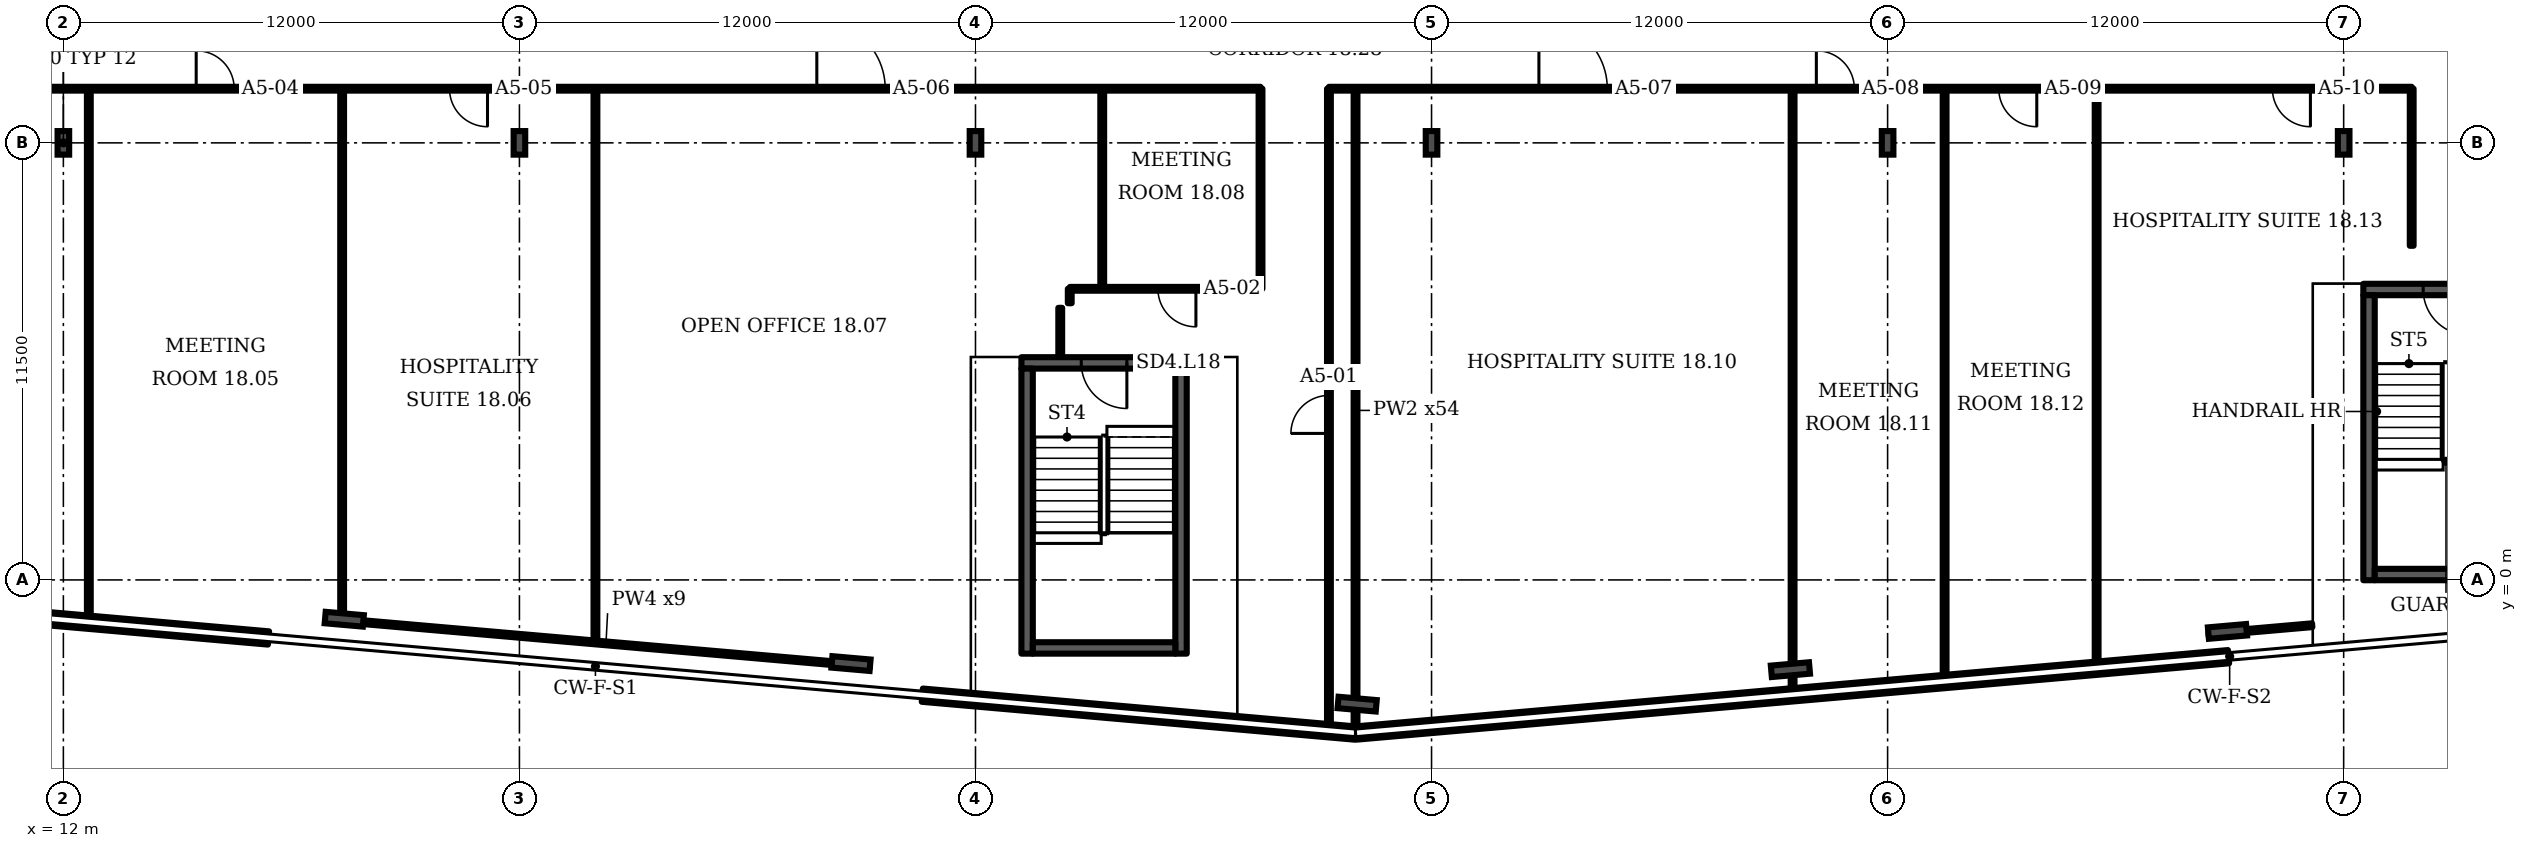
"""IFC4 building model, lengths in metres.
Left out: names, types, materials, properties, quantities, classifications, styles, units other than length and angle.
Written with IfcOpenShell. Run it as: python <this file> out.ifc"""

import sys

from ifc_helpers import new_model, si_unit, direction, frame, frame_2d, origin, origin_2d, place, context, subcontext, project, spatial, rectangle, i_section, extrude, element, fill, save


model = new_model("IFC4")
c1 = context("Model", 3, precision=1e-05, world=origin(), true_north=direction((0.0, 1.0)))
c2 = subcontext(c1, "Body", "Model", "MODEL_VIEW")
j1 = project(units=[si_unit("LENGTHUNIT", "METRE"), si_unit("PLANEANGLEUNIT", "RADIAN")], contexts=[c1])
p1 = place(None, origin())
s1 = spatial("IfcSite", under=j1, at=p1, CompositionType="ELEMENT")
p2 = place(p1, origin())
s2 = spatial("IfcBuilding", under=s1, at=p2, CompositionType="ELEMENT")
p3 = place(p2, frame((0.0, 0.0, 84.7)))
s3 = spatial("IfcBuildingStorey", under=s2, at=p3, CompositionType="ELEMENT", Elevation=84.7)
for number, where, z_axis, x_axis in (
    (1, (19.391, -1.034, 0.0), (0.0, 0.0, 1.0), (-0.087, -0.996, 0.0)),
    (2, (32.724, -2.2, 0.0), (0.0, 0.0, 1.0), (-0.087, -0.996, 0.0)),
    (3, (46.042, -3.268, 0.0), (0.0, 0.0, 1.0), (-0.087, -0.996, 0.0)),
    (4, (57.442, -2.361, 0.0), (0.0, 0.0, 1.0), (0.087, -0.996, 0.0)),
    (5, (68.942, -1.355, 0.0), (0.0, 0.0, 1.0), (0.087, -0.996, 0.0)),
):
    element("IfcColumn", number, at=place(p3, frame(where, z_axis=z_axis, x_axis=x_axis)), inside=s3, PredefinedType="COLUMN", context=c2, shape_type="SweptSolid", body=[
        extrude(i_section(OverallWidth=0.302, OverallDepth=1.008, WebThickness=0.021, FlangeThickness=0.04, FilletRadius=0.03, at=origin_2d()), origin(), (0.0, 0.0, 1.0), 3.6),
    ])
for number, where, z_axis, x_axis in (
    (6, (12.0, 11.5, 0.0), (0.0, 0.0, 1.0), (1.0, 0.0, 0.0)),
    (7, (24.0, 11.5, 0.0), (0.0, 0.0, 1.0), (1.0, 0.0, 0.0)),
    (8, (36.0, 11.5, 0.0), (0.0, 0.0, 1.0), (1.0, 0.0, 0.0)),
    (9, (48.0, 11.5, 0.0), (0.0, 0.0, 1.0), (1.0, 0.0, 0.0)),
    (10, (60.0, 11.5, 0.0), (0.0, 0.0, 1.0), (1.0, 0.0, 0.0)),
    (11, (72.0, 11.5, 0.0), (0.0, 0.0, 1.0), (1.0, 0.0, 0.0)),
):
    element("IfcColumn", number, at=place(p3, frame(where, z_axis=z_axis, x_axis=x_axis)), inside=s3, PredefinedType="COLUMN", context=c2, shape_type="SweptSolid", body=[
        extrude(i_section(OverallWidth=0.305, OverallDepth=0.62, WebThickness=0.021, FlangeThickness=0.04, FilletRadius=0.027, at=origin_2d()), origin(), (0.0, 0.0, 1.0), 3.6),
    ])
p4 = place(p3, frame((5.835, -0.516, 0.0), z_axis=(0.0, 0.0, 1.0), x_axis=(0.996192, -0.087142, 0.0)))
e12 = element("IfcWall", 12, at=p4, inside=s3, PredefinedType="SOLIDWALL", context=c2, shape_type="SweptSolid", body=[
    extrude(rectangle(XDim=11.607, YDim=0.35, at=frame_2d((5.804, 0.0))), origin(), (0.0, 0.0, 1.0), 1.0),
])
p5 = place(p3, frame((34.601, -3.032, 0.0), z_axis=(0.0, 0.0, 1.0), x_axis=(0.996193, -0.087148, 0.0)))
e13 = element("IfcWall", 13, at=p5, inside=s3, PredefinedType="SOLIDWALL", context=c2, shape_type="SweptSolid", body=[
    extrude(rectangle(XDim=11.458, YDim=0.35, at=frame_2d((5.729, 0.0))), origin(), (0.0, 0.0, 1.0), 1.0),
])
p6 = place(p3, frame((46.045, -4.026, 0.0), z_axis=(0.0, 0.0, 1.0), x_axis=(0.99619, 0.087163, 0.0)))
e14 = element("IfcWall", 14, at=p6, inside=s3, PredefinedType="SOLIDWALL", context=c2, shape_type="SweptSolid", body=[
    extrude(rectangle(XDim=23.013, YDim=0.35, at=frame_2d((11.506, 0.0))), origin(), (0.0, 0.0, 1.0), 1.0),
])
p7 = place(p3, frame((37.208, 5.711, 0.0), z_axis=(0.0, 0.0, 1.0), x_axis=(1.0, 0.0, 0.0)))
e15 = element("IfcWall", 15, at=p7, inside=s3, PredefinedType="SHEAR", context=c2, shape_type="SweptSolid", body=[
    extrude(rectangle(XDim=4.35, YDim=0.3, at=frame_2d((2.175, 0.0))), origin(), (0.0, 0.0, 1.0), 3.2),
])
p8 = place(p7, frame((1.575, 0.0, 0.0)))
e16 = element("IfcOpeningElement", 16, at=p8, cuts=e15, PredefinedType="OPENING", context=c2, shape_type="SweptSolid", body=[
    extrude(rectangle(XDim=1.2, YDim=2.1, at=frame_2d((0.6, 1.05))), frame((0.0, 0.16, 0.0), z_axis=(0.0, -1.0, 0.0), x_axis=(1.0, 0.0, 0.0)), (0.0, 0.0, 1.0), 0.32),
])
p9 = place(p3, frame((72.518, 7.642, 0.0), z_axis=(0.0, 0.0, 1.0), x_axis=(1.0, 0.0, 0.0)))
e17 = element("IfcWall", 17, at=p9, inside=s3, PredefinedType="SHEAR", context=c2, shape_type="SweptSolid", body=[
    extrude(rectangle(XDim=4.35, YDim=0.3, at=frame_2d((2.175, 0.0))), origin(), (0.0, 0.0, 1.0), 3.2),
])
p10 = place(p9, frame((1.575, 0.0, 0.0)))
e18 = element("IfcOpeningElement", 18, at=p10, cuts=e17, PredefinedType="OPENING", context=c2, shape_type="SweptSolid", body=[
    extrude(rectangle(XDim=1.2, YDim=2.1, at=frame_2d((0.6, 1.05))), frame((0.0, 0.16, 0.0), z_axis=(0.0, -1.0, 0.0), x_axis=(1.0, 0.0, 0.0)), (0.0, 0.0, 1.0), 0.32),
])
p11 = place(p3, frame((0.02, 12.925, 0.0), z_axis=(0.0, 0.0, 1.0), x_axis=(1.0, 0.0, 0.0)))
e19 = element("IfcWall", 19, at=p11, inside=s3, PredefinedType="PARTITIONING", context=c2, shape_type="SweptSolid", body=[
    extrude(rectangle(XDim=43.48, YDim=0.1, at=frame_2d((21.74, 0.0))), origin(), (0.0, 0.0, 1.0), 3.2),
])
p12 = place(p11, frame((5.405, 0.0, 0.0)))
e20 = element("IfcOpeningElement", 20, at=p12, cuts=e19, PredefinedType="OPENING", context=c2, shape_type="SweptSolid", body=[
    extrude(rectangle(XDim=1.8, YDim=2.1, at=frame_2d((0.9, 1.05))), frame((0.0, 0.06, 0.0), z_axis=(0.0, -1.0, 0.0), x_axis=(1.0, 0.0, 0.0)), (0.0, 0.0, 1.0), 0.12),
])
p13 = place(p11, frame((15.475, 0.0, 0.0)))
e21 = element("IfcOpeningElement", 21, at=p13, cuts=e19, PredefinedType="OPENING", context=c2, shape_type="SweptSolid", body=[
    extrude(rectangle(XDim=1.0, YDim=2.1, at=frame_2d((0.5, 1.05))), frame((0.0, 0.06, 0.0), z_axis=(0.0, -1.0, 0.0), x_axis=(1.0, 0.0, 0.0)), (0.0, 0.0, 1.0), 0.12),
])
p14 = place(p11, frame((22.14, 0.0, 0.0)))
e22 = element("IfcOpeningElement", 22, at=p14, cuts=e19, PredefinedType="OPENING", context=c2, shape_type="SweptSolid", body=[
    extrude(rectangle(XDim=1.0, YDim=2.1, at=frame_2d((0.5, 1.05))), frame((0.0, 0.06, 0.0), z_axis=(0.0, -1.0, 0.0), x_axis=(1.0, 0.0, 0.0)), (0.0, 0.0, 1.0), 0.12),
])
p15 = place(p11, frame((31.805, 0.0, 0.0)))
e23 = element("IfcOpeningElement", 23, at=p15, cuts=e19, PredefinedType="OPENING", context=c2, shape_type="SweptSolid", body=[
    extrude(rectangle(XDim=1.8, YDim=2.1, at=frame_2d((0.9, 1.05))), frame((0.0, 0.06, 0.0), z_axis=(0.0, -1.0, 0.0), x_axis=(1.0, 0.0, 0.0)), (0.0, 0.0, 1.0), 0.12),
])
p16 = place(p3, frame((12.67, -1.088, 0.0), z_axis=(0.0, 0.0, 1.0), x_axis=(0.0, 1.0, 0.0)))
e24 = element("IfcWall", 24, at=p16, inside=s3, PredefinedType="PARTITIONING", context=c2, shape_type="SweptSolid", body=[
    extrude(rectangle(XDim=14.013, YDim=0.1, at=frame_2d((7.007, 0.0))), origin(), (0.0, 0.0, 1.0), 3.2),
])
p17 = place(p3, frame((19.335, -1.06, 0.0), z_axis=(0.0, 0.0, 1.0), x_axis=(0.0, 1.0, 0.0)))
e25 = element("IfcWall", 25, at=p17, inside=s3, PredefinedType="PARTITIONING", context=c2, shape_type="SweptSolid", body=[
    extrude(rectangle(XDim=13.985, YDim=0.1, at=frame_2d((6.993, 0.0))), origin(), (0.0, 0.0, 1.0), 3.2),
])
p18 = place(p3, frame((26.0, -1.645, 0.0), z_axis=(0.0, 0.0, 1.0), x_axis=(0.0, 1.0, 0.0)))
e26 = element("IfcWall", 26, at=p18, inside=s3, PredefinedType="PARTITIONING", context=c2, shape_type="SweptSolid", body=[
    extrude(rectangle(XDim=14.57, YDim=0.1, at=frame_2d((7.285, 0.0))), origin(), (0.0, 0.0, 1.0), 3.2),
])
p19 = place(p3, frame((33.22, -2.275, 0.0), z_axis=(0.0, 0.0, 1.0), x_axis=(-0.996218, 0.086914, 0.0)))
e27 = element("IfcWall", 27, at=p19, inside=s3, PredefinedType="PARTITIONING", context=c2, shape_type="SweptSolid", body=[
    extrude(rectangle(XDim=13.938, YDim=0.1, at=frame_2d((6.969, 0.0))), origin(), (0.0, 0.0, 1.0), 2.58),
])
p20 = place(p3, frame((38.23, 5.881, 0.0), z_axis=(0.0, 0.0, 1.0), x_axis=(0.0, 1.0, 0.0)))
e28 = element("IfcWall", 28, at=p20, inside=s3, PredefinedType="PARTITIONING", context=c2, shape_type="SweptSolid", body=[
    extrude(rectangle(XDim=1.279, YDim=0.1, at=frame_2d((0.64, 0.0))), origin(), (0.0, 0.0, 1.0), 3.2),
])
p21 = place(p3, frame((38.48, 7.28, 0.0), z_axis=(0.0, 0.0, 1.0), x_axis=(0.0, 1.0, 0.0)))
e29 = element("IfcWall", 29, at=p21, inside=s3, PredefinedType="PARTITIONING", context=c2, shape_type="SweptSolid", body=[
    extrude(rectangle(XDim=0.38, YDim=0.1, at=frame_2d((0.19, 0.0))), origin(), (0.0, 0.0, 1.0), 3.2),
])
p22 = place(p3, frame((38.485, 7.66, 0.0), z_axis=(0.0, 0.0, 1.0), x_axis=(1.0, 0.0, 0.0)))
e30 = element("IfcWall", 30, at=p22, inside=s3, PredefinedType="PARTITIONING", context=c2, shape_type="SweptSolid", body=[
    extrude(rectangle(XDim=5.015, YDim=0.1, at=frame_2d((2.507, 0.0))), origin(), (0.0, 0.0, 1.0), 3.2),
])
p23 = place(p22, frame((2.315, 0.0, 0.0)))
e31 = element("IfcOpeningElement", 31, at=p23, cuts=e30, PredefinedType="OPENING", context=c2, shape_type="SweptSolid", body=[
    extrude(rectangle(XDim=1.0, YDim=2.1, at=frame_2d((0.5, 1.05))), frame((0.0, 0.06, 0.0), z_axis=(0.0, -1.0, 0.0), x_axis=(1.0, 0.0, 0.0)), (0.0, 0.0, 1.0), 0.12),
])
for number, where, z_axis, x_axis in (
    (32, (39.335, 7.66, 0.0), (0.0, 0.0, 1.0), (0.0, 1.0, 0.0)),
    (33, (43.5, 7.66, 0.0), (0.0, 0.0, 1.0), (0.0, 1.0, 0.0)),
):
    element("IfcWall", number, at=place(p3, frame(where, z_axis=z_axis, x_axis=x_axis)), inside=s3, PredefinedType="PARTITIONING", context=c2, shape_type="SweptSolid", body=[
        extrude(rectangle(XDim=5.265, YDim=0.1, at=frame_2d((2.633, 0.0))), origin(), (0.0, 0.0, 1.0), 3.2),
    ])
p24 = place(p3, frame((45.3, -3.943, 0.0), z_axis=(0.0, 0.0, 1.0), x_axis=(0.0, 1.0, 0.0)))
e34 = element("IfcWall", 34, at=p24, inside=s3, PredefinedType="PARTITIONING", context=c2, shape_type="SweptSolid", body=[
    extrude(rectangle(XDim=16.868, YDim=0.1, at=frame_2d((8.434, 0.0))), origin(), (0.0, 0.0, 1.0), 2.58),
])
p25 = place(p24, frame((7.798, 0.0, 0.0)))
e35 = element("IfcOpeningElement", 35, at=p25, cuts=e34, PredefinedType="OPENING", context=c2, shape_type="SweptSolid", body=[
    extrude(rectangle(XDim=1.0, YDim=2.1, at=frame_2d((0.5, 1.05))), frame((0.0, 0.06, 0.0), z_axis=(0.0, -1.0, 0.0), x_axis=(1.0, 0.0, 0.0)), (0.0, 0.0, 1.0), 0.12),
])
p26 = place(p3, frame((45.3, 12.925, 0.0), z_axis=(0.0, 0.0, 1.0), x_axis=(1.0, 0.0, 0.0)))
e36 = element("IfcWall", 36, at=p26, inside=s3, PredefinedType="PARTITIONING", context=c2, shape_type="SweptSolid", body=[
    extrude(rectangle(XDim=28.49, YDim=0.1, at=frame_2d((14.245, 0.0))), origin(), (0.0, 0.0, 1.0), 3.2),
])
p27 = place(p26, frame((5.525, 0.0, 0.0)))
e37 = element("IfcOpeningElement", 37, at=p27, cuts=e36, PredefinedType="OPENING", context=c2, shape_type="SweptSolid", body=[
    extrude(rectangle(XDim=1.8, YDim=2.1, at=frame_2d((0.9, 1.05))), frame((0.0, 0.06, 0.0), z_axis=(0.0, -1.0, 0.0), x_axis=(1.0, 0.0, 0.0)), (0.0, 0.0, 1.0), 0.12),
])
p28 = place(p26, frame((12.825, 0.0, 0.0)))
e38 = element("IfcOpeningElement", 38, at=p28, cuts=e36, PredefinedType="OPENING", context=c2, shape_type="SweptSolid", body=[
    extrude(rectangle(XDim=1.0, YDim=2.1, at=frame_2d((0.5, 1.05))), frame((0.0, 0.06, 0.0), z_axis=(0.0, -1.0, 0.0), x_axis=(1.0, 0.0, 0.0)), (0.0, 0.0, 1.0), 0.12),
])
p29 = place(p26, frame((17.625, 0.0, 0.0)))
e39 = element("IfcOpeningElement", 39, at=p29, cuts=e36, PredefinedType="OPENING", context=c2, shape_type="SweptSolid", body=[
    extrude(rectangle(XDim=1.0, YDim=2.1, at=frame_2d((0.5, 1.05))), frame((0.0, 0.06, 0.0), z_axis=(0.0, -1.0, 0.0), x_axis=(1.0, 0.0, 0.0)), (0.0, 0.0, 1.0), 0.12),
])
p30 = place(p26, frame((24.825, 0.0, 0.0)))
e40 = element("IfcOpeningElement", 40, at=p30, cuts=e36, PredefinedType="OPENING", context=c2, shape_type="SweptSolid", body=[
    extrude(rectangle(XDim=1.0, YDim=2.1, at=frame_2d((0.5, 1.05))), frame((0.0, 0.06, 0.0), z_axis=(0.0, -1.0, 0.0), x_axis=(1.0, 0.0, 0.0)), (0.0, 0.0, 1.0), 0.12),
])
p31 = place(p3, frame((46.0, -4.004, 0.0), z_axis=(0.0, 0.0, 1.0), x_axis=(0.0, 1.0, 0.0)))
e41 = element("IfcWall", 41, at=p31, inside=s3, PredefinedType="PARTITIONING", context=c2, shape_type="SweptSolid", body=[
    extrude(rectangle(XDim=16.929, YDim=0.1, at=frame_2d((8.465, 0.0))), origin(), (0.0, 0.0, 1.0), 3.2),
])
p32 = place(p3, frame((57.5, -2.998, 0.0), z_axis=(0.0, 0.0, 1.0), x_axis=(0.0, 1.0, 0.0)))
e42 = element("IfcWall", 42, at=p32, inside=s3, PredefinedType="PARTITIONING", context=c2, shape_type="SweptSolid", body=[
    extrude(rectangle(XDim=15.923, YDim=0.1, at=frame_2d((7.962, 0.0))), origin(), (0.0, 0.0, 1.0), 3.2),
])
p33 = place(p3, frame((61.5, -2.648, 0.0), z_axis=(0.0, 0.0, 1.0), x_axis=(0.0, 1.0, 0.0)))
e43 = element("IfcWall", 43, at=p33, inside=s3, PredefinedType="PARTITIONING", context=c2, shape_type="SweptSolid", body=[
    extrude(rectangle(XDim=15.573, YDim=0.1, at=frame_2d((7.787, 0.0))), origin(), (0.0, 0.0, 1.0), 2.58),
])
p34 = place(p3, frame((65.5, -2.298, 0.0), z_axis=(0.0, 0.0, 1.0), x_axis=(0.0, 1.0, 0.0)))
e44 = element("IfcWall", 44, at=p34, inside=s3, PredefinedType="PARTITIONING", context=c2, shape_type="SweptSolid", body=[
    extrude(rectangle(XDim=15.223, YDim=0.1, at=frame_2d((7.612, 0.0))), origin(), (0.0, 0.0, 1.0), 2.58),
])
p35 = place(p3, frame((68.445, -1.43, 0.0), z_axis=(0.0, 0.0, 1.0), x_axis=(0.996195, 0.087118, 0.0)))
e45 = element("IfcWall", 45, at=p35, inside=s3, PredefinedType="PARTITIONING", context=c2, shape_type="SweptSolid", body=[
    extrude(rectangle(XDim=2.738, YDim=0.1, at=frame_2d((1.369, 0.0))), origin(), (0.0, 0.0, 1.0), 2.58),
])
p36 = place(p3, frame((73.79, 8.792, 0.0), z_axis=(0.0, 0.0, 1.0), x_axis=(0.0, 1.0, 0.0)))
e46 = element("IfcWall", 46, at=p36, inside=s3, PredefinedType="PARTITIONING", context=c2, shape_type="SweptSolid", body=[
    extrude(rectangle(XDim=4.133, YDim=0.1, at=frame_2d((2.066, 0.0))), origin(), (0.0, 0.0, 1.0), 3.2),
])
for number, where, z_axis, x_axis in (
    (47, (37.358, -1.939, 0.0), (0.0, 0.0, 1.0), (0.0, 1.0, 0.0)),
    (48, (41.408, -1.939, 0.0), (0.0, 0.0, 1.0), (0.0, 1.0, 0.0)),
):
    element("IfcWall", number, at=place(p3, frame(where, z_axis=z_axis, x_axis=x_axis)), inside=s3, PredefinedType="SHEAR", context=c2, shape_type="SweptSolid", body=[
        extrude(rectangle(XDim=7.5, YDim=0.3, at=frame_2d((3.75, 0.0))), origin(), (0.0, 0.0, 1.0), 3.2),
    ])
p37 = place(p3, frame((37.508, -1.789, 0.0), z_axis=(0.0, 0.0, 1.0), x_axis=(1.0, 0.0, 0.0)))
e49 = element("IfcWall", 49, at=p37, inside=s3, PredefinedType="SHEAR", context=c2, shape_type="SweptSolid", body=[
    extrude(rectangle(XDim=3.75, YDim=0.3, at=frame_2d((1.875, 0.0))), origin(), (0.0, 0.0, 1.0), 3.2),
])
p38 = place(p3, frame((72.667, -0.008, 0.0), z_axis=(0.0, 0.0, 1.0), x_axis=(0.0, 1.0, 0.0)))
e50 = element("IfcWall", 50, at=p38, inside=s3, PredefinedType="SHEAR", context=c2, shape_type="SweptSolid", body=[
    extrude(rectangle(XDim=7.5, YDim=0.3, at=frame_2d((3.75, 0.0))), origin(), (0.0, 0.0, 1.0), 3.2),
])
p39 = place(p3, frame((72.817, 0.142, 0.0), z_axis=(0.0, 0.0, 1.0), x_axis=(1.0, 0.0, 0.0)))
e51 = element("IfcWall", 51, at=p39, inside=s3, PredefinedType="SHEAR", context=c2, shape_type="SweptSolid", body=[
    extrude(rectangle(XDim=3.75, YDim=0.3, at=frame_2d((1.875, 0.0))), origin(), (0.0, 0.0, 1.0), 3.2),
])
p40 = place(p8, origin())
e52 = element("IfcDoor", 52, at=p40, inside=s3, OperationType="SINGLE_SWING_RIGHT", PredefinedType="DOOR", context=c2, shape_type="SweptSolid", body=[
    extrude(rectangle(XDim=1.2, YDim=2.1, at=frame_2d((0.6, 1.05))), frame((0.0, 0.025, 0.0), z_axis=(0.0, -1.0, 0.0), x_axis=(1.0, 0.0, 0.0)), (0.0, 0.0, 1.0), 0.05),
])
fill(e16, e52)
p41 = place(p10, origin())
e53 = element("IfcDoor", 53, at=p41, inside=s3, OperationType="SINGLE_SWING_RIGHT", PredefinedType="DOOR", context=c2, shape_type="SweptSolid", body=[
    extrude(rectangle(XDim=1.2, YDim=2.1, at=frame_2d((0.6, 1.05))), frame((0.0, 0.025, 0.0), z_axis=(0.0, -1.0, 0.0), x_axis=(1.0, 0.0, 0.0)), (0.0, 0.0, 1.0), 0.05),
])
fill(e18, e53)
p42 = place(p25, origin())
e54 = element("IfcDoor", 54, at=p42, inside=s3, OperationType="SINGLE_SWING_LEFT", PredefinedType="DOOR", context=c2, shape_type="SweptSolid", body=[
    extrude(rectangle(XDim=1.0, YDim=2.1, at=frame_2d((0.5, 1.05))), frame((0.0, 0.025, 0.0), z_axis=(0.0, -1.0, 0.0), x_axis=(1.0, 0.0, 0.0)), (0.0, 0.0, 1.0), 0.05),
])
fill(e35, e54)
p43 = place(p23, origin())
e55 = element("IfcDoor", 55, at=p43, inside=s3, OperationType="SINGLE_SWING_RIGHT", PredefinedType="DOOR", context=c2, shape_type="SweptSolid", body=[
    extrude(rectangle(XDim=1.0, YDim=2.1, at=frame_2d((0.5, 1.05))), frame((0.0, 0.025, 0.0), z_axis=(0.0, -1.0, 0.0), x_axis=(1.0, 0.0, 0.0)), (0.0, 0.0, 1.0), 0.05),
])
fill(e31, e55)
p44 = place(p13, origin())
e56 = element("IfcDoor", 56, at=p44, inside=s3, OperationType="SINGLE_SWING_LEFT", PredefinedType="DOOR", context=c2, shape_type="SweptSolid", body=[
    extrude(rectangle(XDim=1.0, YDim=2.1, at=frame_2d((0.5, 1.05))), frame((0.0, 0.025, 0.0), z_axis=(0.0, -1.0, 0.0), x_axis=(1.0, 0.0, 0.0)), (0.0, 0.0, 1.0), 0.05),
])
fill(e21, e56)
p45 = place(p14, origin())
e57 = element("IfcDoor", 57, at=p45, inside=s3, OperationType="SINGLE_SWING_RIGHT", PredefinedType="DOOR", context=c2, shape_type="SweptSolid", body=[
    extrude(rectangle(XDim=1.0, YDim=2.1, at=frame_2d((0.5, 1.05))), frame((0.0, 0.025, 0.0), z_axis=(0.0, -1.0, 0.0), x_axis=(1.0, 0.0, 0.0)), (0.0, 0.0, 1.0), 0.05),
])
fill(e22, e57)
p46 = place(p15, origin())
e58 = element("IfcDoor", 58, at=p46, inside=s3, OperationType="DOUBLE_DOOR_SINGLE_SWING", PredefinedType="DOOR", context=c2, shape_type="SweptSolid", body=[
    extrude(rectangle(XDim=1.8, YDim=2.1, at=frame_2d((0.9, 1.05))), frame((0.0, 0.025, 0.0), z_axis=(0.0, -1.0, 0.0), x_axis=(1.0, 0.0, 0.0)), (0.0, 0.0, 1.0), 0.05),
])
fill(e23, e58)
p47 = place(p27, origin())
e59 = element("IfcDoor", 59, at=p47, inside=s3, OperationType="DOUBLE_DOOR_SINGLE_SWING", PredefinedType="DOOR", context=c2, shape_type="SweptSolid", body=[
    extrude(rectangle(XDim=1.8, YDim=2.1, at=frame_2d((0.9, 1.05))), frame((0.0, 0.025, 0.0), z_axis=(0.0, -1.0, 0.0), x_axis=(1.0, 0.0, 0.0)), (0.0, 0.0, 1.0), 0.05),
])
fill(e37, e59)
p48 = place(p28, origin())
e60 = element("IfcDoor", 60, at=p48, inside=s3, OperationType="SINGLE_SWING_LEFT", PredefinedType="DOOR", context=c2, shape_type="SweptSolid", body=[
    extrude(rectangle(XDim=1.0, YDim=2.1, at=frame_2d((0.5, 1.05))), frame((0.0, 0.025, 0.0), z_axis=(0.0, -1.0, 0.0), x_axis=(1.0, 0.0, 0.0)), (0.0, 0.0, 1.0), 0.05),
])
fill(e38, e60)
p49 = place(p29, origin())
e61 = element("IfcDoor", 61, at=p49, inside=s3, OperationType="SINGLE_SWING_RIGHT", PredefinedType="DOOR", context=c2, shape_type="SweptSolid", body=[
    extrude(rectangle(XDim=1.0, YDim=2.1, at=frame_2d((0.5, 1.05))), frame((0.0, 0.025, 0.0), z_axis=(0.0, -1.0, 0.0), x_axis=(1.0, 0.0, 0.0)), (0.0, 0.0, 1.0), 0.05),
])
fill(e39, e61)
p50 = place(p30, origin())
e62 = element("IfcDoor", 62, at=p50, inside=s3, OperationType="SINGLE_SWING_RIGHT", PredefinedType="DOOR", context=c2, shape_type="SweptSolid", body=[
    extrude(rectangle(XDim=1.0, YDim=2.1, at=frame_2d((0.5, 1.05))), frame((0.0, 0.025, 0.0), z_axis=(0.0, -1.0, 0.0), x_axis=(1.0, 0.0, 0.0)), (0.0, 0.0, 1.0), 0.05),
])
fill(e40, e62)
save(model, sys.argv[1])
